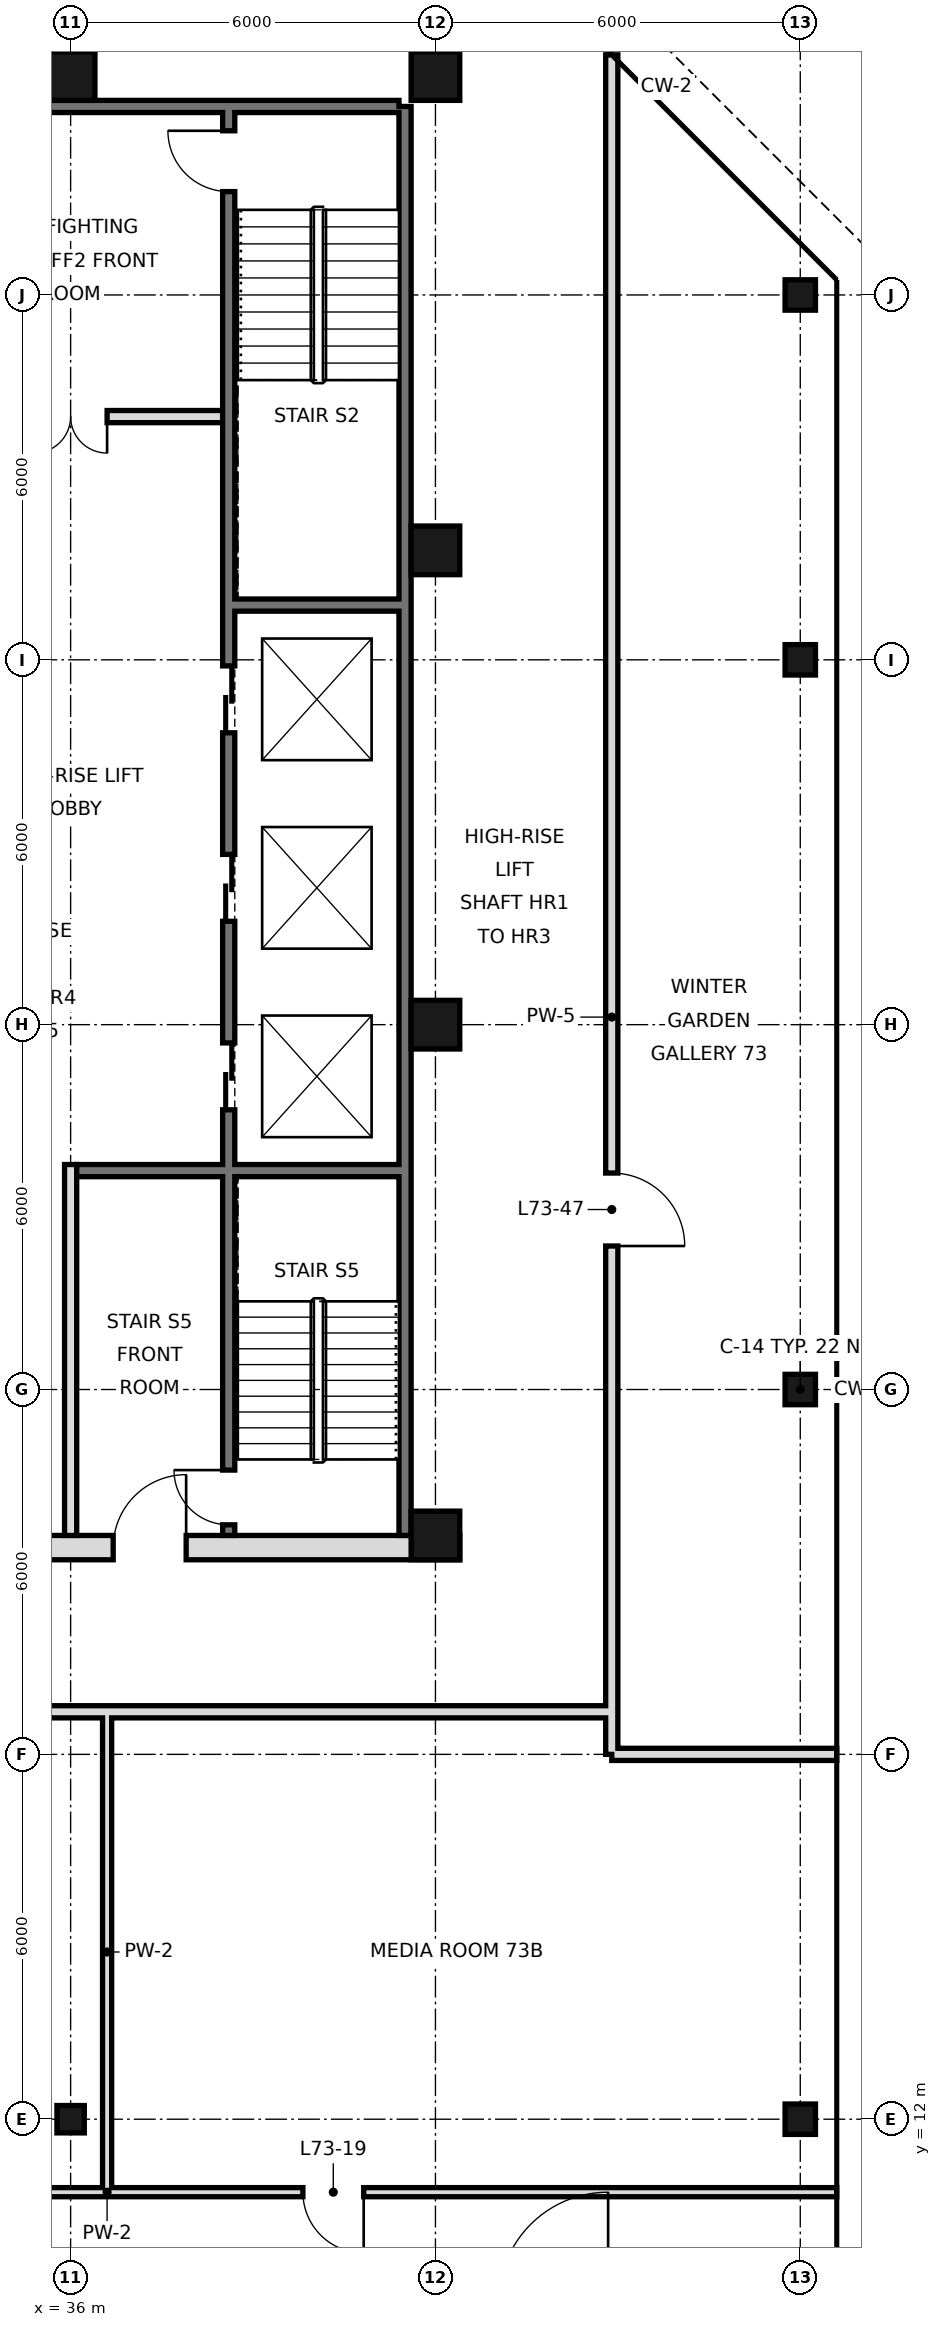
"""IFC4 building model, lengths in metres.
Left out: names, types, materials, properties, quantities, classifications, styles, units other than length and angle.
Written with IfcOpenShell. Run it as: python <this file> out.ifc"""

import sys

from ifc_helpers import new_model, si_unit, direction, frame, frame_2d, origin, origin_2d, place, context, subcontext, project, spatial, rectangle, hollow_rectangle, extrude, element, fill, save


model = new_model("IFC4")
c1 = context("Model", 3, precision=1e-05, world=origin(), true_north=direction((0.0, 1.0)))
c2 = subcontext(c1, "Body", "Model", "MODEL_VIEW")
j1 = project(units=[si_unit("LENGTHUNIT", "METRE"), si_unit("PLANEANGLEUNIT", "RADIAN")], contexts=[c1])
p1 = place(None, origin())
s1 = spatial("IfcSite", under=j1, at=p1, CompositionType="ELEMENT")
p2 = place(p1, origin())
s2 = spatial("IfcBuilding", under=s1, at=p2, CompositionType="ELEMENT")
p3 = place(p2, frame((0.0, 0.0, 308.8)))
s3 = spatial("IfcBuildingStorey", under=s2, at=p3, CompositionType="ELEMENT", Elevation=308.8)
p4 = place(p3, frame((36.0, 12.0, 0.0), z_axis=(0.0, 0.0, 1.0), x_axis=(1.0, 0.0, 0.0)))
e1 = element("IfcColumn", 1, at=p4, inside=s3, PredefinedType="COLUMN", context=c2, shape_type="SweptSolid", body=[
    extrude(hollow_rectangle(XDim=0.45, YDim=0.45, WallThickness=0.022, at=origin_2d()), origin(), (0.0, 0.0, 1.0), 3.6),
])
for number, where, z_axis, x_axis in (
    (2, (36.0, 45.6, 0.0), (0.0, 0.0, 1.0), (1.0, 0.0, 0.0)),
    (3, (42.0, 21.6, 0.0), (0.0, 0.0, 1.0), (1.0, 0.0, 0.0)),
    (4, (42.0, 30.0, 0.0), (0.0, 0.0, 1.0), (1.0, 0.0, 0.0)),
    (5, (42.0, 37.8, 0.0), (0.0, 0.0, 1.0), (1.0, 0.0, 0.0)),
    (6, (42.0, 45.6, 0.0), (0.0, 0.0, 1.0), (1.0, 0.0, 0.0)),
):
    element("IfcColumn", number, at=place(p3, frame(where, z_axis=z_axis, x_axis=x_axis)), inside=s3, PredefinedType="COLUMN", context=c2, shape_type="SweptSolid", body=[
        extrude(hollow_rectangle(XDim=0.8, YDim=0.8, WallThickness=0.025, at=origin_2d()), origin(), (0.0, 0.0, 1.0), 3.6),
    ])
for number, where, z_axis, x_axis in (
    (7, (48.0, 12.0, 0.0), (0.0, 0.0, 1.0), (1.0, 0.0, 0.0)),
    (8, (48.0, 24.0, 0.0), (0.0, 0.0, 1.0), (1.0, 0.0, 0.0)),
    (9, (48.0, 36.0, 0.0), (0.0, 0.0, 1.0), (1.0, 0.0, 0.0)),
    (10, (48.0, 42.0, 0.0), (0.0, 0.0, 1.0), (1.0, 0.0, 0.0)),
):
    element("IfcColumn", number, at=place(p3, frame(where, z_axis=z_axis, x_axis=x_axis)), inside=s3, PredefinedType="COLUMN", context=c2, shape_type="SweptSolid", body=[
        extrude(hollow_rectangle(XDim=0.5, YDim=0.5, WallThickness=0.025, at=origin_2d()), origin(), (0.0, 0.0, 1.0), 3.6),
    ])
p5 = place(p3, frame((36.6, 10.8, 0.0), z_axis=(0.0, 0.0, 1.0), x_axis=(0.0, 1.0, 0.0)))
e11 = element("IfcWall", 11, at=p5, inside=s3, PredefinedType="PARTITIONING", context=c2, shape_type="SweptSolid", body=[
    extrude(rectangle(XDim=7.9, YDim=0.15, at=frame_2d((3.95, 0.0))), origin(), (0.0, 0.0, 1.0), 3.42),
])
p6 = place(p3, frame((44.9, 18.0, 0.0), z_axis=(0.0, 0.0, 1.0), x_axis=(0.0, 1.0, 0.0)))
e12 = element("IfcWall", 12, at=p6, inside=s3, PredefinedType="SOLIDWALL", context=c2, shape_type="SweptSolid", body=[
    extrude(rectangle(XDim=27.949, YDim=0.2, at=frame_2d((13.975, 0.0))), origin(), (0.0, 0.0, 1.0), 2.97),
])
p7 = place(p6, frame((8.36, 0.0, 0.0)))
e13 = element("IfcOpeningElement", 13, at=p7, cuts=e12, PredefinedType="OPENING", context=c2, shape_type="SweptSolid", body=[
    extrude(rectangle(XDim=1.2, YDim=2.4, at=frame_2d((0.6, 1.2))), frame((0.0, 0.11, 0.0), z_axis=(0.0, -1.0, 0.0), x_axis=(1.0, 0.0, 0.0)), (0.0, 0.0, 1.0), 0.22),
])
p8 = place(p3, frame((24.6, 10.8, 0.0), z_axis=(0.0, 0.0, 1.0), x_axis=(1.0, 0.0, 0.0)))
e14 = element("IfcWall", 14, at=p8, inside=s3, PredefinedType="PARTITIONING", context=c2, shape_type="SweptSolid", body=[
    extrude(rectangle(XDim=24.0, YDim=0.15, at=frame_2d((12.0, 0.0))), origin(), (0.0, 0.0, 1.0), 3.42),
])
p9 = place(p8, frame((5.5, 0.0, 0.0)))
e15 = element("IfcOpeningElement", 15, at=p9, cuts=e14, PredefinedType="OPENING", context=c2, shape_type="SweptSolid", body=[
    extrude(rectangle(XDim=1.0, YDim=2.4, at=frame_2d((0.5, 1.2))), frame((0.0, 0.085, 0.0), z_axis=(0.0, -1.0, 0.0), x_axis=(1.0, 0.0, 0.0)), (0.0, 0.0, 1.0), 0.17),
])
p10 = place(p8, frame((15.22, 0.0, 0.0)))
e16 = element("IfcOpeningElement", 16, at=p10, cuts=e14, PredefinedType="OPENING", context=c2, shape_type="SweptSolid", body=[
    extrude(rectangle(XDim=1.0, YDim=2.4, at=frame_2d((0.5, 1.2))), frame((0.0, 0.085, 0.0), z_axis=(0.0, -1.0, 0.0), x_axis=(1.0, 0.0, 0.0)), (0.0, 0.0, 1.0), 0.17),
])
p11 = place(p3, frame((44.9, 18.0, 0.0), z_axis=(0.0, 0.0, 1.0), x_axis=(1.0, 0.0, 0.0)))
e17 = element("IfcWall", 17, at=p11, inside=s3, PredefinedType="SOLIDWALL", context=c2, shape_type="SweptSolid", body=[
    extrude(rectangle(XDim=3.7, YDim=0.2, at=frame_2d((1.85, 0.0))), origin(), (0.0, 0.0, 1.0), 2.72),
])
p12 = place(p3, frame((24.6, 18.7, 0.0), z_axis=(0.0, 0.0, 1.0), x_axis=(1.0, 0.0, 0.0)))
e18 = element("IfcWall", 18, at=p12, inside=s3, PredefinedType="SOLIDWALL", context=c2, shape_type="SweptSolid", body=[
    extrude(rectangle(XDim=20.3, YDim=0.2, at=frame_2d((10.15, 0.0))), origin(), (0.0, 0.0, 1.0), 2.72),
])
p13 = place(p3, frame((41.5, 21.6, 0.0), z_axis=(0.0, 0.0, 1.0), x_axis=(0.0, 1.0, 0.0)))
e19 = element("IfcWall", 19, at=p13, inside=s3, PredefinedType="SOLIDWALL", context=c2, shape_type="SweptSolid", body=[
    extrude(rectangle(XDim=23.5, YDim=0.2, at=frame_2d((11.75, 0.0))), origin(), (0.0, 0.0, 1.0), 3.42),
])
p14 = place(p3, frame((6.6, 45.1, 0.0), z_axis=(0.0, 0.0, 1.0), x_axis=(1.0, 0.0, 0.0)))
e20 = element("IfcWall", 20, at=p14, inside=s3, PredefinedType="SOLIDWALL", context=c2, shape_type="SweptSolid", body=[
    extrude(rectangle(XDim=34.8, YDim=0.2, at=frame_2d((17.4, 0.0))), origin(), (0.0, 0.0, 1.0), 3.42),
])
p15 = place(p3, frame((5.6, 21.4, 0.0), z_axis=(0.0, 0.0, 1.0), x_axis=(1.0, 0.0, 0.0)))
e21 = element("IfcWall", 21, at=p15, inside=s3, PredefinedType="SOLIDWALL", context=c2, shape_type="SweptSolid", body=[
    extrude(rectangle(XDim=36.8, YDim=0.4, at=frame_2d((18.4, 0.0))), origin(), (0.0, 0.0, 1.0), 3.42),
])
p16 = place(p15, frame((8.5, 0.0, 0.0)))
e22 = element("IfcOpeningElement", 22, at=p16, cuts=e21, PredefinedType="OPENING", context=c2, shape_type="SweptSolid", body=[
    extrude(rectangle(XDim=1.8, YDim=2.1, at=frame_2d((0.9, 1.05))), frame((0.0, 0.21, 0.0), z_axis=(0.0, -1.0, 0.0), x_axis=(1.0, 0.0, 0.0)), (0.0, 0.0, 1.0), 0.42),
])
p17 = place(p15, frame((17.5, 0.0, 0.0)))
e23 = element("IfcOpeningElement", 23, at=p17, cuts=e21, PredefinedType="OPENING", context=c2, shape_type="SweptSolid", body=[
    extrude(rectangle(XDim=1.8, YDim=2.1, at=frame_2d((0.9, 1.05))), frame((0.0, 0.21, 0.0), z_axis=(0.0, -1.0, 0.0), x_axis=(1.0, 0.0, 0.0)), (0.0, 0.0, 1.0), 0.42),
])
p18 = place(p15, frame((26.5, 0.0, 0.0)))
e24 = element("IfcOpeningElement", 24, at=p18, cuts=e21, PredefinedType="OPENING", context=c2, shape_type="SweptSolid", body=[
    extrude(rectangle(XDim=1.8, YDim=2.1, at=frame_2d((0.9, 1.05))), frame((0.0, 0.21, 0.0), z_axis=(0.0, -1.0, 0.0), x_axis=(1.0, 0.0, 0.0)), (0.0, 0.0, 1.0), 0.42),
])
p19 = place(p15, frame((4.5, 0.0, 0.0)))
e25 = element("IfcOpeningElement", 25, at=p19, cuts=e21, PredefinedType="OPENING", context=c2, shape_type="SweptSolid", body=[
    extrude(rectangle(XDim=1.2, YDim=2.1, at=frame_2d((0.6, 1.05))), frame((0.0, 0.21, 0.0), z_axis=(0.0, -1.0, 0.0), x_axis=(1.0, 0.0, 0.0)), (0.0, 0.0, 1.0), 0.42),
])
p20 = place(p15, frame((31.1, 0.0, 0.0)))
e26 = element("IfcOpeningElement", 26, at=p20, cuts=e21, PredefinedType="OPENING", context=c2, shape_type="SweptSolid", body=[
    extrude(rectangle(XDim=1.2, YDim=2.1, at=frame_2d((0.6, 1.05))), frame((0.0, 0.21, 0.0), z_axis=(0.0, -1.0, 0.0), x_axis=(1.0, 0.0, 0.0)), (0.0, 0.0, 1.0), 0.42),
])
p21 = place(p3, frame((36.0, 21.6, 0.0), z_axis=(0.0, 0.0, 1.0), x_axis=(0.0, 1.0, 0.0)))
e27 = element("IfcWall", 27, at=p21, inside=s3, PredefinedType="PARTITIONING", context=c2, shape_type="SweptSolid", body=[
    extrude(rectangle(XDim=6.1, YDim=0.2, at=frame_2d((3.05, 0.0))), origin(), (0.0, 0.0, 1.0), 3.42),
])
p22 = place(p3, frame((38.6, 21.6, 0.0), z_axis=(0.0, 0.0, 1.0), x_axis=(0.0, 1.0, 0.0)))
e28 = element("IfcWall", 28, at=p22, inside=s3, PredefinedType="SOLIDWALL", context=c2, shape_type="SweptSolid", body=[
    extrude(rectangle(XDim=23.4, YDim=0.2, at=frame_2d((11.7, 0.0))), origin(), (0.0, 0.0, 1.0), 3.42),
])
p23 = place(p22, frame((7.0, 0.0, 0.0)))
e29 = element("IfcOpeningElement", 29, at=p23, cuts=e28, PredefinedType="OPENING", context=c2, shape_type="SweptSolid", body=[
    extrude(rectangle(XDim=1.1, YDim=2.1, at=frame_2d((0.55, 1.05))), frame((0.0, 0.11, 0.0), z_axis=(0.0, -1.0, 0.0), x_axis=(1.0, 0.0, 0.0)), (0.0, 0.0, 1.0), 0.22),
])
p24 = place(p22, frame((10.1, 0.0, 0.0)))
e30 = element("IfcOpeningElement", 30, at=p24, cuts=e28, PredefinedType="OPENING", context=c2, shape_type="SweptSolid", body=[
    extrude(rectangle(XDim=1.1, YDim=2.1, at=frame_2d((0.55, 1.05))), frame((0.0, 0.11, 0.0), z_axis=(0.0, -1.0, 0.0), x_axis=(1.0, 0.0, 0.0)), (0.0, 0.0, 1.0), 0.22),
])
p25 = place(p22, frame((13.2, 0.0, 0.0)))
e31 = element("IfcOpeningElement", 31, at=p25, cuts=e28, PredefinedType="OPENING", context=c2, shape_type="SweptSolid", body=[
    extrude(rectangle(XDim=1.1, YDim=2.1, at=frame_2d((0.55, 1.05))), frame((0.0, 0.11, 0.0), z_axis=(0.0, -1.0, 0.0), x_axis=(1.0, 0.0, 0.0)), (0.0, 0.0, 1.0), 0.22),
])
p26 = place(p22, frame((22.1, 0.0, 0.0)))
e32 = element("IfcOpeningElement", 32, at=p26, cuts=e28, PredefinedType="OPENING", context=c2, shape_type="SweptSolid", body=[
    extrude(rectangle(XDim=1.0, YDim=2.1, at=frame_2d((0.5, 1.05))), frame((0.0, 0.11, 0.0), z_axis=(0.0, -1.0, 0.0), x_axis=(1.0, 0.0, 0.0)), (0.0, 0.0, 1.0), 0.22),
])
p27 = place(p22, frame((0.175, 0.0, 0.0)))
e33 = element("IfcOpeningElement", 33, at=p27, cuts=e28, PredefinedType="OPENING", context=c2, shape_type="SweptSolid", body=[
    extrude(rectangle(XDim=0.9, YDim=2.1, at=frame_2d((0.45, 1.05))), frame((0.0, 0.11, 0.0), z_axis=(0.0, -1.0, 0.0), x_axis=(1.0, 0.0, 0.0)), (0.0, 0.0, 1.0), 0.22),
])
p28 = place(p3, frame((36.1, 27.6, 0.0), z_axis=(0.0, 0.0, 1.0), x_axis=(1.0, 0.0, 0.0)))
e34 = element("IfcWall", 34, at=p28, inside=s3, PredefinedType="SOLIDWALL", context=c2, shape_type="SweptSolid", body=[
    extrude(rectangle(XDim=5.3, YDim=0.2, at=frame_2d((2.65, 0.0))), origin(), (0.0, 0.0, 1.0), 3.42),
])
p29 = place(p3, frame((38.7, 36.9, 0.0), z_axis=(0.0, 0.0, 1.0), x_axis=(1.0, 0.0, 0.0)))
e35 = element("IfcWall", 35, at=p29, inside=s3, PredefinedType="SOLIDWALL", context=c2, shape_type="SweptSolid", body=[
    extrude(rectangle(XDim=2.7, YDim=0.2, at=frame_2d((1.35, 0.0))), origin(), (0.0, 0.0, 1.0), 3.42),
])
p30 = place(p3, frame((33.5, 40.0, 0.0), z_axis=(0.0, 0.0, 1.0), x_axis=(1.0, 0.0, 0.0)))
e36 = element("IfcWall", 36, at=p30, inside=s3, PredefinedType="PARTITIONING", context=c2, shape_type="SweptSolid", body=[
    extrude(rectangle(XDim=5.0, YDim=0.2, at=frame_2d((2.5, 0.0))), origin(), (0.0, 0.0, 1.0), 3.42),
])
p31 = place(p30, frame((1.9, 0.0, 0.0)))
e37 = element("IfcOpeningElement", 37, at=p31, cuts=e36, PredefinedType="OPENING", context=c2, shape_type="SweptSolid", body=[
    extrude(rectangle(XDim=1.2, YDim=2.1, at=frame_2d((0.6, 1.05))), frame((0.0, 0.11, 0.0), z_axis=(0.0, -1.0, 0.0), x_axis=(1.0, 0.0, 0.0)), (0.0, 0.0, 1.0), 0.22),
])
p32 = place(p10, origin())
e38 = element("IfcDoor", 38, at=p32, inside=s3, OperationType="SINGLE_SWING_RIGHT", PredefinedType="DOOR", context=c2, shape_type="SweptSolid", body=[
    extrude(rectangle(XDim=1.0, YDim=2.4, at=frame_2d((0.5, 1.2))), frame((0.0, 0.025, 0.0), z_axis=(0.0, -1.0, 0.0), x_axis=(1.0, 0.0, 0.0)), (0.0, 0.0, 1.0), 0.05),
])
fill(e16, e38)
p33 = place(p7, frame((1.2, 0.0, 0.0), z_axis=(0.0, 0.0, 1.0), x_axis=(-1.0, 0.0, 0.0)))
e39 = element("IfcDoor", 39, at=p33, inside=s3, OperationType="SINGLE_SWING_RIGHT", PredefinedType="DOOR", context=c2, shape_type="SweptSolid", body=[
    extrude(rectangle(XDim=1.2, YDim=2.4, at=frame_2d((0.6, 1.2))), frame((0.0, 0.025, 0.0), z_axis=(0.0, -1.0, 0.0), x_axis=(1.0, 0.0, 0.0)), (0.0, 0.0, 1.0), 0.05),
])
fill(e13, e39)
p34 = place(p20, frame((1.2, 0.0, 0.0), z_axis=(0.0, 0.0, 1.0), x_axis=(-1.0, 0.0, 0.0)))
e40 = element("IfcDoor", 40, at=p34, inside=s3, OperationType="SINGLE_SWING_LEFT", PredefinedType="DOOR", context=c2, shape_type="SweptSolid", body=[
    extrude(rectangle(XDim=1.2, YDim=2.1, at=frame_2d((0.6, 1.05))), frame((0.0, 0.025, 0.0), z_axis=(0.0, -1.0, 0.0), x_axis=(1.0, 0.0, 0.0)), (0.0, 0.0, 1.0), 0.05),
])
fill(e26, e40)
p35 = place(p31, frame((1.2, 0.0, 0.0), z_axis=(0.0, 0.0, 1.0), x_axis=(-1.0, 0.0, 0.0)))
e41 = element("IfcDoor", 41, at=p35, inside=s3, OperationType="DOUBLE_DOOR_SINGLE_SWING", PredefinedType="DOOR", context=c2, shape_type="SweptSolid", body=[
    extrude(rectangle(XDim=1.2, YDim=2.1, at=frame_2d((0.6, 1.05))), frame((0.0, 0.025, 0.0), z_axis=(0.0, -1.0, 0.0), x_axis=(1.0, 0.0, 0.0)), (0.0, 0.0, 1.0), 0.05),
])
fill(e37, e41)
p36 = place(p23, origin())
e42 = element("IfcDoor", 42, at=p36, inside=s3, OperationType="DOUBLE_DOOR_SLIDING", PredefinedType="DOOR", context=c2, shape_type="SweptSolid", body=[
    extrude(rectangle(XDim=1.1, YDim=2.1, at=frame_2d((0.55, 1.05))), frame((0.0, 0.025, 0.0), z_axis=(0.0, -1.0, 0.0), x_axis=(1.0, 0.0, 0.0)), (0.0, 0.0, 1.0), 0.05),
])
fill(e29, e42)
p37 = place(p24, origin())
e43 = element("IfcDoor", 43, at=p37, inside=s3, OperationType="DOUBLE_DOOR_SLIDING", PredefinedType="DOOR", context=c2, shape_type="SweptSolid", body=[
    extrude(rectangle(XDim=1.1, YDim=2.1, at=frame_2d((0.55, 1.05))), frame((0.0, 0.025, 0.0), z_axis=(0.0, -1.0, 0.0), x_axis=(1.0, 0.0, 0.0)), (0.0, 0.0, 1.0), 0.05),
])
fill(e30, e43)
p38 = place(p25, origin())
e44 = element("IfcDoor", 44, at=p38, inside=s3, OperationType="DOUBLE_DOOR_SLIDING", PredefinedType="DOOR", context=c2, shape_type="SweptSolid", body=[
    extrude(rectangle(XDim=1.1, YDim=2.1, at=frame_2d((0.55, 1.05))), frame((0.0, 0.025, 0.0), z_axis=(0.0, -1.0, 0.0), x_axis=(1.0, 0.0, 0.0)), (0.0, 0.0, 1.0), 0.05),
])
fill(e31, e44)
p39 = place(p26, frame((1.0, 0.0, 0.0), z_axis=(0.0, 0.0, 1.0), x_axis=(-1.0, 0.0, 0.0)))
e45 = element("IfcDoor", 45, at=p39, inside=s3, OperationType="SINGLE_SWING_LEFT", PredefinedType="DOOR", context=c2, shape_type="SweptSolid", body=[
    extrude(rectangle(XDim=1.0, YDim=2.1, at=frame_2d((0.5, 1.05))), frame((0.0, 0.025, 0.0), z_axis=(0.0, -1.0, 0.0), x_axis=(1.0, 0.0, 0.0)), (0.0, 0.0, 1.0), 0.05),
])
fill(e32, e45)
p40 = place(p27, frame((0.9, 0.0, 0.0), z_axis=(0.0, 0.0, 1.0), x_axis=(-1.0, 0.0, 0.0)))
e46 = element("IfcDoor", 46, at=p40, inside=s3, OperationType="SINGLE_SWING_LEFT", PredefinedType="DOOR", context=c2, shape_type="SweptSolid", body=[
    extrude(rectangle(XDim=0.9, YDim=2.1, at=frame_2d((0.45, 1.05))), frame((0.0, 0.025, 0.0), z_axis=(0.0, -1.0, 0.0), x_axis=(1.0, 0.0, 0.0)), (0.0, 0.0, 1.0), 0.05),
])
fill(e33, e46)
save(model, sys.argv[1])
